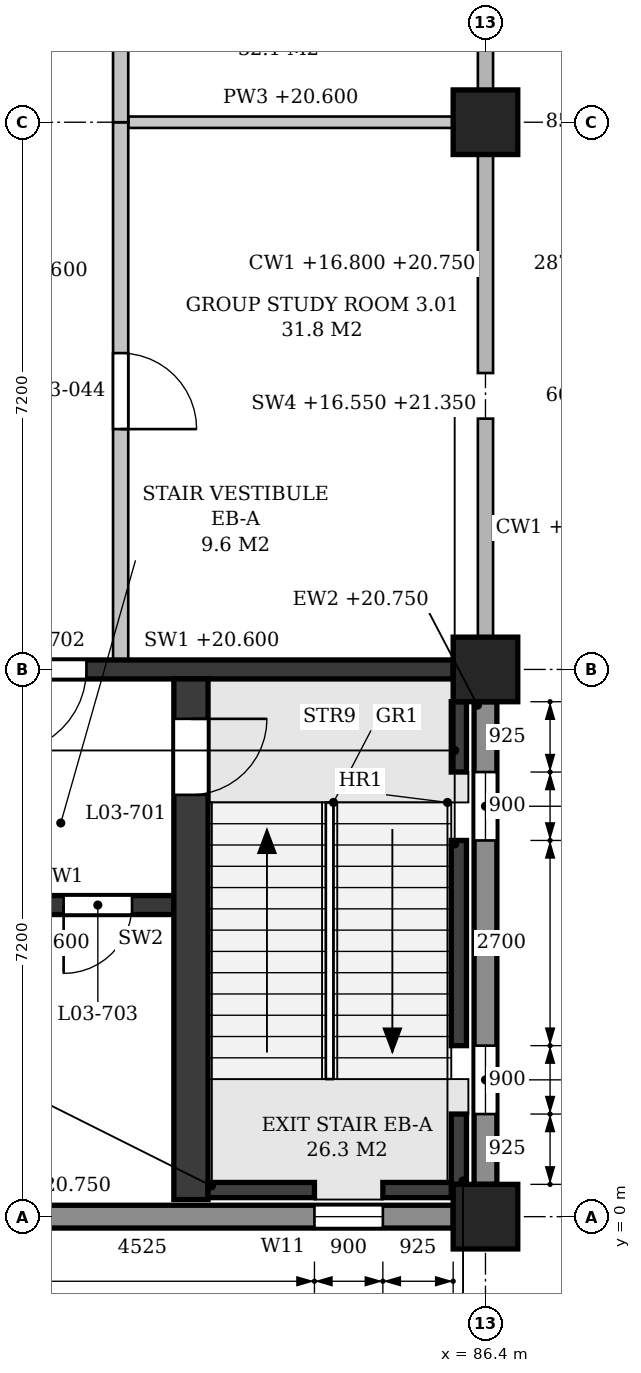
"""IFC4 building model, lengths in metres.
Left out: names, types, materials, properties, quantities, classifications, styles, units other than length and angle.
Written with IfcOpenShell. Run it as: python <this file> out.ifc"""

import sys

from ifc_helpers import new_model, si_unit, direction, frame, frame_2d, origin, origin_2d, place, context, subcontext, project, spatial, polyline, rectangle, outline, extrude, element, fill, save


model = new_model("IFC4")
c1 = context("Model", 3, precision=1e-05, world=origin(), true_north=direction((0.0, 1.0)))
c2 = subcontext(c1, "Body", "Model", "MODEL_VIEW")
j1 = project(units=[si_unit("LENGTHUNIT", "METRE"), si_unit("PLANEANGLEUNIT", "RADIAN")], contexts=[c1])
p1 = place(None, origin())
s1 = spatial("IfcSite", under=j1, at=p1, CompositionType="ELEMENT")
p2 = place(p1, origin())
s2 = spatial("IfcBuilding", under=s1, at=p2, CompositionType="ELEMENT")
p3 = place(p2, frame((0.0, 0.0, 16.8)))
s3 = spatial("IfcBuildingStorey", under=s2, at=p3, CompositionType="ELEMENT", Elevation=16.8)
for number, where, z_axis, x_axis in (
    (1, (86.4, 0.0, 0.0), (0.0, 0.0, 1.0), (1.0, 0.0, 0.0)),
    (2, (86.4, 7.2, 0.0), (0.0, 0.0, 1.0), (1.0, 0.0, 0.0)),
    (3, (86.4, 14.4, 0.0), (0.0, 0.0, 1.0), (1.0, 0.0, 0.0)),
):
    element("IfcColumn", number, at=place(p3, frame(where, z_axis=z_axis, x_axis=x_axis)), inside=s3, PredefinedType="COLUMN", context=c2, shape_type="SweptSolid", body=[
        extrude(rectangle(XDim=0.85, YDim=0.85, at=origin_2d()), origin(), (0.0, 0.0, 1.0), 4.8),
    ])
p4 = place(p3, frame((79.625, 0.0, 0.0), z_axis=(0.0, 0.0, 1.0), x_axis=(1.0, 0.0, 0.0)))
e4 = element("IfcWall", 4, at=p4, inside=s3, PredefinedType="STANDARD", context=c2, shape_type="SweptSolid", body=[
    extrude(rectangle(XDim=6.35, YDim=0.3, at=frame_2d((3.175, 0.0))), origin(), (0.0, 0.0, 1.0), 3.95),
])
p5 = place(p4, frame((4.525, 0.0, 0.9)))
e5 = element("IfcOpeningElement", 5, at=p5, cuts=e4, PredefinedType="OPENING", context=c2, shape_type="SweptSolid", body=[
    extrude(outline(polyline([(0.0, 0.0), (0.9, 0.0), (0.9, 2.05), (0.45, 2.5), (0.0, 2.05), (0.0, 0.0)])), frame((0.0, 0.16, 0.0), z_axis=(0.0, -1.0, 0.0), x_axis=(1.0, 0.0, 0.0)), (0.0, 0.0, 1.0), 0.32),
])
p6 = place(p3, frame((86.4, 0.425, 0.0), z_axis=(0.0, 0.0, 1.0), x_axis=(0.0, 1.0, 0.0)))
e6 = element("IfcWall", 6, at=p6, inside=s3, PredefinedType="STANDARD", context=c2, shape_type="SweptSolid", body=[
    extrude(rectangle(XDim=6.35, YDim=0.3, at=frame_2d((3.175, 0.0))), origin(), (0.0, 0.0, 1.0), 3.95),
])
p7 = place(p6, frame((0.925, 0.0, 0.9)))
e7 = element("IfcOpeningElement", 7, at=p7, cuts=e6, PredefinedType="OPENING", context=c2, shape_type="SweptSolid", body=[
    extrude(outline(polyline([(0.0, 0.0), (0.9, 0.0), (0.9, 2.05), (0.45, 2.5), (0.0, 2.05), (0.0, 0.0)])), frame((0.0, 0.16, 0.0), z_axis=(0.0, -1.0, 0.0), x_axis=(1.0, 0.0, 0.0)), (0.0, 0.0, 1.0), 0.32),
])
p8 = place(p6, frame((4.525, 0.0, 0.9)))
e8 = element("IfcOpeningElement", 8, at=p8, cuts=e6, PredefinedType="OPENING", context=c2, shape_type="SweptSolid", body=[
    extrude(outline(polyline([(0.0, 0.0), (0.9, 0.0), (0.9, 2.05), (0.45, 2.5), (0.0, 2.05), (0.0, 0.0)])), frame((0.0, 0.16, 0.0), z_axis=(0.0, -1.0, 0.0), x_axis=(1.0, 0.0, 0.0)), (0.0, 0.0, 1.0), 0.32),
])
p9 = place(p3, frame((79.625, 7.2, 0.0), z_axis=(0.0, 0.0, 1.0), x_axis=(1.0, 0.0, 0.0)))
e9 = element("IfcWall", 9, at=p9, inside=s3, PredefinedType="SHEAR", context=c2, shape_type="SweptSolid", body=[
    extrude(rectangle(XDim=6.35, YDim=0.25, at=frame_2d((3.175, 0.0))), origin(), (0.0, 0.0, 1.0), 3.8),
])
p10 = place(p9, frame((0.425, 0.0, 0.0)))
e10 = element("IfcOpeningElement", 10, at=p10, cuts=e9, PredefinedType="OPENING", context=c2, shape_type="SweptSolid", body=[
    extrude(rectangle(XDim=1.1, YDim=2.1, at=frame_2d((0.55, 1.05))), frame((0.0, 0.135, 0.0), z_axis=(0.0, -1.0, 0.0), x_axis=(1.0, 0.0, 0.0)), (0.0, 0.0, 1.0), 0.27),
])
p11 = place(p3, frame((86.05, 0.425, -0.25), z_axis=(0.0, 0.0, 1.0), x_axis=(0.0, 1.0, 0.0)))
e11 = element("IfcWall", 11, at=p11, inside=s3, PredefinedType="SHEAR", context=c2, shape_type="SweptSolid", body=[
    extrude(rectangle(XDim=0.925, YDim=0.2, at=frame_2d((0.462, 0.0))), origin(), (0.0, 0.0, 1.0), 4.8),
])
p12 = place(p3, frame((86.05, 2.25, -0.25), z_axis=(0.0, 0.0, 1.0), x_axis=(0.0, 1.0, 0.0)))
e12 = element("IfcWall", 12, at=p12, inside=s3, PredefinedType="SHEAR", context=c2, shape_type="SweptSolid", body=[
    extrude(rectangle(XDim=2.7, YDim=0.2, at=frame_2d((1.35, 0.0))), origin(), (0.0, 0.0, 1.0), 4.8),
])
p13 = place(p3, frame((86.05, 5.85, -0.25), z_axis=(0.0, 0.0, 1.0), x_axis=(0.0, 1.0, 0.0)))
e13 = element("IfcWall", 13, at=p13, inside=s3, PredefinedType="SHEAR", context=c2, shape_type="SweptSolid", body=[
    extrude(rectangle(XDim=0.925, YDim=0.2, at=frame_2d((0.462, 0.0))), origin(), (0.0, 0.0, 1.0), 4.8),
])
p14 = place(p3, frame((82.75, 0.35, -0.25), z_axis=(0.0, 0.0, 1.0), x_axis=(1.0, 0.0, 0.0)))
e14 = element("IfcWall", 14, at=p14, inside=s3, PredefinedType="SHEAR", context=c2, shape_type="SweptSolid", body=[
    extrude(rectangle(XDim=1.4, YDim=0.2, at=frame_2d((0.7, 0.0))), origin(), (0.0, 0.0, 1.0), 4.8),
])
p15 = place(p3, frame((85.05, 0.35, -0.25), z_axis=(0.0, 0.0, 1.0), x_axis=(1.0, 0.0, 0.0)))
e15 = element("IfcWall", 15, at=p15, inside=s3, PredefinedType="SHEAR", context=c2, shape_type="SweptSolid", body=[
    extrude(rectangle(XDim=0.9, YDim=0.2, at=frame_2d((0.45, 0.0))), origin(), (0.0, 0.0, 1.0), 4.8),
])
p16 = place(p3, frame((82.525, 0.225, 0.0), z_axis=(0.0, 0.0, 1.0), x_axis=(0.0, 1.0, 0.0)))
e16 = element("IfcWall", 16, at=p16, inside=s3, PredefinedType="SHEAR", context=c2, shape_type="SweptSolid", body=[
    extrude(rectangle(XDim=6.85, YDim=0.45, at=frame_2d((3.425, 0.0))), origin(), (0.0, 0.0, 1.0), 4.55),
])
p17 = place(p16, frame((5.325, 0.0, 0.0)))
e17 = element("IfcOpeningElement", 17, at=p17, cuts=e16, PredefinedType="OPENING", context=c2, shape_type="SweptSolid", body=[
    extrude(rectangle(XDim=1.0, YDim=2.1, at=frame_2d((0.5, 1.05))), frame((0.0, 0.235, 0.0), z_axis=(0.0, -1.0, 0.0), x_axis=(1.0, 0.0, 0.0)), (0.0, 0.0, 1.0), 0.47),
])
p18 = place(p3, frame((79.325, 4.1, 0.0), z_axis=(0.0, 0.0, 1.0), x_axis=(1.0, 0.0, 0.0)))
e18 = element("IfcWall", 18, at=p18, inside=s3, PredefinedType="SHEAR", context=c2, shape_type="SweptSolid", body=[
    extrude(rectangle(XDim=2.975, YDim=0.25, at=frame_2d((1.488, 0.0))), origin(), (0.0, 0.0, 1.0), 4.55),
])
p19 = place(p18, frame((1.525, 0.0, 0.0)))
e19 = element("IfcOpeningElement", 19, at=p19, cuts=e18, PredefinedType="OPENING", context=c2, shape_type="SweptSolid", body=[
    extrude(rectangle(XDim=0.9, YDim=2.1, at=frame_2d((0.45, 1.05))), frame((0.0, 0.135, 0.0), z_axis=(0.0, -1.0, 0.0), x_axis=(1.0, 0.0, 0.0)), (0.0, 0.0, 1.0), 0.27),
])
p20 = place(p3, frame((81.7, 14.4, 0.0), z_axis=(0.0, 0.0, 1.0), x_axis=(1.0, 0.0, 0.0)))
e20 = element("IfcWall", 20, at=p20, inside=s3, PredefinedType="PARTITIONING", context=c2, shape_type="SweptSolid", body=[
    extrude(rectangle(XDim=4.275, YDim=0.15, at=frame_2d((2.138, 0.0))), origin(), (0.0, 0.0, 1.0), 3.8),
])
p21 = place(p3, frame((81.6, 7.325, 0.0), z_axis=(0.0, 0.0, 1.0), x_axis=(0.0, 1.0, 0.0)))
e21 = element("IfcWall", 21, at=p21, inside=s3, PredefinedType="PARTITIONING", context=c2, shape_type="SweptSolid", body=[
    extrude(outline(polyline([(0.0, 0.0), (7.075, 0.0), (7.075, 3.8), (6.825, 3.8), (6.825, 4.55), (0.125, 4.55), (0.125, 3.8), (0.0, 3.8), (0.0, 0.0)])), frame((0.0, 0.1, 0.0), z_axis=(0.0, -1.0, 0.0), x_axis=(1.0, 0.0, 0.0)), (0.0, 0.0, 1.0), 0.2),
])
p22 = place(p21, frame((3.037, 0.0, 0.0)))
e22 = element("IfcOpeningElement", 22, at=p22, cuts=e21, PredefinedType="OPENING", context=c2, shape_type="SweptSolid", body=[
    extrude(rectangle(XDim=1.0, YDim=2.1, at=frame_2d((0.5, 1.05))), frame((0.0, 0.11, 0.0), z_axis=(0.0, -1.0, 0.0), x_axis=(1.0, 0.0, 0.0)), (0.0, 0.0, 1.0), 0.22),
])
p23 = place(p3, frame((81.6, 14.4, 0.0), z_axis=(0.0, 0.0, 1.0), x_axis=(0.0, 1.0, 0.0)))
e23 = element("IfcWall", 23, at=p23, inside=s3, PredefinedType="PARTITIONING", context=c2, shape_type="SweptSolid", body=[
    extrude(outline(polyline([(0.0, 0.0), (7.2, 0.0), (7.2, 3.8), (6.95, 3.8), (6.95, 4.55), (0.25, 4.55), (0.25, 3.8), (0.0, 3.8), (0.0, 0.0)])), frame((0.0, 0.1, 0.0), z_axis=(0.0, -1.0, 0.0), x_axis=(1.0, 0.0, 0.0)), (0.0, 0.0, 1.0), 0.2),
])
p24 = place(p23, frame((2.6, 0.0, 0.0)))
e24 = element("IfcOpeningElement", 24, at=p24, cuts=e23, PredefinedType="OPENING", context=c2, shape_type="SweptSolid", body=[
    extrude(rectangle(XDim=2.0, YDim=2.1, at=frame_2d((1.0, 1.05))), frame((0.0, 0.11, 0.0), z_axis=(0.0, -1.0, 0.0), x_axis=(1.0, 0.0, 0.0)), (0.0, 0.0, 1.0), 0.22),
])
p25 = place(p7, origin())
e25 = element("IfcWindow", 25, at=p25, inside=s3, PartitioningType="SINGLE_PANEL", PredefinedType="WINDOW", context=c2, shape_type="SweptSolid", body=[
    extrude(outline(polyline([(0.0, 0.0), (0.9, 0.0), (0.9, 2.05), (0.45, 2.5), (0.0, 2.05), (0.0, 0.0)])), frame((0.0, 0.03, 0.0), z_axis=(0.0, -1.0, 0.0), x_axis=(1.0, 0.0, 0.0)), (0.0, 0.0, 1.0), 0.06),
])
fill(e7, e25)
p26 = place(p8, origin())
e26 = element("IfcWindow", 26, at=p26, inside=s3, PartitioningType="SINGLE_PANEL", PredefinedType="WINDOW", context=c2, shape_type="SweptSolid", body=[
    extrude(outline(polyline([(0.0, 0.0), (0.9, 0.0), (0.9, 2.05), (0.45, 2.5), (0.0, 2.05), (0.0, 0.0)])), frame((0.0, 0.03, 0.0), z_axis=(0.0, -1.0, 0.0), x_axis=(1.0, 0.0, 0.0)), (0.0, 0.0, 1.0), 0.06),
])
fill(e8, e26)
p27 = place(p5, origin())
e27 = element("IfcWindow", 27, at=p27, inside=s3, PartitioningType="SINGLE_PANEL", PredefinedType="WINDOW", context=c2, shape_type="SweptSolid", body=[
    extrude(outline(polyline([(0.0, 0.0), (0.9, 0.0), (0.9, 2.05), (0.45, 2.5), (0.0, 2.05), (0.0, 0.0)])), frame((0.0, 0.03, 0.0), z_axis=(0.0, -1.0, 0.0), x_axis=(1.0, 0.0, 0.0)), (0.0, 0.0, 1.0), 0.06),
])
fill(e5, e27)
p28 = place(p17, frame((1.0, 0.0, 0.0), z_axis=(0.0, 0.0, 1.0), x_axis=(-1.0, 0.0, 0.0)))
e28 = element("IfcDoor", 28, at=p28, inside=s3, OperationType="SINGLE_SWING_LEFT", PredefinedType="DOOR", context=c2, shape_type="SweptSolid", body=[
    extrude(rectangle(XDim=1.0, YDim=2.1, at=frame_2d((0.5, 1.05))), frame((0.0, 0.025, 0.0), z_axis=(0.0, -1.0, 0.0), x_axis=(1.0, 0.0, 0.0)), (0.0, 0.0, 1.0), 0.05),
])
fill(e17, e28)
p29 = place(p10, frame((1.1, 0.0, 0.0), z_axis=(0.0, 0.0, 1.0), x_axis=(-1.0, 0.0, 0.0)))
e29 = element("IfcDoor", 29, at=p29, inside=s3, OperationType="SINGLE_SWING_RIGHT", PredefinedType="DOOR", context=c2, shape_type="SweptSolid", body=[
    extrude(rectangle(XDim=1.1, YDim=2.1, at=frame_2d((0.55, 1.05))), frame((0.0, 0.025, 0.0), z_axis=(0.0, -1.0, 0.0), x_axis=(1.0, 0.0, 0.0)), (0.0, 0.0, 1.0), 0.05),
])
fill(e10, e29)
p30 = place(p19, frame((0.9, 0.0, 0.0), z_axis=(0.0, 0.0, 1.0), x_axis=(-1.0, 0.0, 0.0)))
e30 = element("IfcDoor", 30, at=p30, inside=s3, OperationType="SINGLE_SWING_RIGHT", PredefinedType="DOOR", context=c2, shape_type="SweptSolid", body=[
    extrude(rectangle(XDim=0.9, YDim=2.1, at=frame_2d((0.45, 1.05))), frame((0.0, 0.025, 0.0), z_axis=(0.0, -1.0, 0.0), x_axis=(1.0, 0.0, 0.0)), (0.0, 0.0, 1.0), 0.05),
])
fill(e19, e30)
p31 = place(p22, frame((1.0, 0.0, 0.0), z_axis=(0.0, 0.0, 1.0), x_axis=(-1.0, 0.0, 0.0)))
e31 = element("IfcDoor", 31, at=p31, inside=s3, OperationType="SINGLE_SWING_RIGHT", PredefinedType="DOOR", context=c2, shape_type="SweptSolid", body=[
    extrude(rectangle(XDim=1.0, YDim=2.1, at=frame_2d((0.5, 1.05))), frame((0.0, 0.025, 0.0), z_axis=(0.0, -1.0, 0.0), x_axis=(1.0, 0.0, 0.0)), (0.0, 0.0, 1.0), 0.05),
])
fill(e22, e31)
save(model, sys.argv[1])
